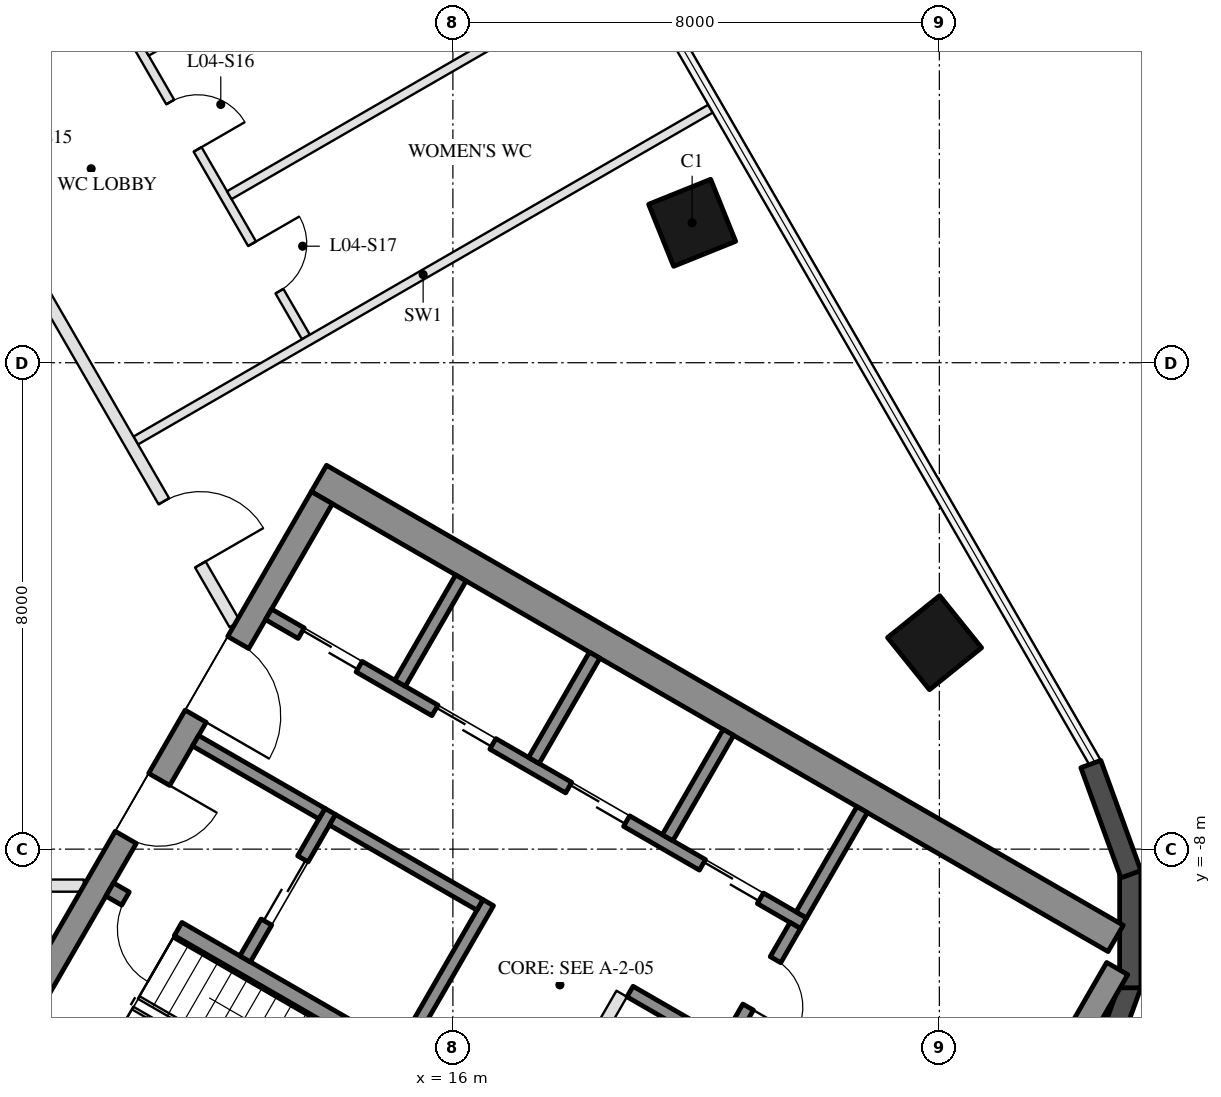
"""IFC4 building model, lengths in metres.
Left out: names, types, materials, properties, quantities, classifications, styles, units other than length and angle.
Written with IfcOpenShell. Run it as: python <this file> out.ifc"""

import sys

from ifc_helpers import new_model, si_unit, direction, frame, frame_2d, origin, origin_2d, place, context, subcontext, project, spatial, rectangle, hollow_rectangle, extrude, boolean, halfspace, element, fill, save


model = new_model("IFC4")
c1 = context("Model", 3, precision=1e-05, world=origin(), true_north=direction((0.0, 1.0)))
c2 = subcontext(c1, "Body", "Model", "MODEL_VIEW")
j1 = project(units=[si_unit("LENGTHUNIT", "METRE"), si_unit("PLANEANGLEUNIT", "RADIAN")], contexts=[c1])
p1 = place(None, origin())
s1 = spatial("IfcSite", under=j1, at=p1, CompositionType="ELEMENT")
p2 = place(p1, origin())
s2 = spatial("IfcBuilding", under=s1, at=p2, CompositionType="ELEMENT")
p3 = place(p2, frame((0.0, 0.0, 28.5)))
s3 = spatial("IfcBuildingStorey", under=s2, at=p3, CompositionType="ELEMENT", Elevation=28.5)
p4 = place(p3, frame((23.921, -4.604, 0.0), z_axis=(-0.038923767258, 0.006017462626, 0.999224064205), x_axis=(0.500000890421, -0.865672860901, 0.024690230408)))
e1 = element("IfcColumn", 1, at=p4, inside=s3, PredefinedType="COLUMN", context=c2, shape_type="SweptSolid", body=[
    boolean("DIFFERENCE", boolean("DIFFERENCE", extrude(hollow_rectangle(XDim=1.1, YDim=1.1, WallThickness=0.05, at=origin_2d()), origin(), (0.0, 0.0, 1.0), 4.503), halfspace(frame((0.0, 0.0, 0.013), z_axis=(0.0, 0.0, 1.0), x_axis=(1.0, 0.0, 0.0)), True)), halfspace(frame((0.0, 0.0, 4.491), z_axis=(0.0, 0.0, 1.0), x_axis=(1.0, 0.0, 0.0)), False)),
])
p5 = place(p3, frame((19.934, 2.301, 0.0), z_axis=(-0.032751169552, -0.004609022205, 0.999452909249), x_axis=(0.499064961058, -0.866476451895, 0.012358112959)))
e2 = element("IfcColumn", 2, at=p5, inside=s3, PredefinedType="COLUMN", context=c2, shape_type="SweptSolid", body=[
    boolean("DIFFERENCE", boolean("DIFFERENCE", extrude(hollow_rectangle(XDim=1.1, YDim=1.1, WallThickness=0.05, at=origin_2d()), origin(), (0.0, 0.0, 1.0), 4.502), halfspace(frame((0.0, 0.0, 0.011), z_axis=(0.0, 0.0, 1.0), x_axis=(1.0, 0.0, 0.0)), True)), halfspace(frame((0.0, 0.0, 4.492), z_axis=(0.0, 0.0, 1.0), x_axis=(1.0, 0.0, 0.0)), False)),
])
for number, where, z_axis, x_axis in (
    (3, (26.491, -12.033, 0.0), (0.0, 0.0, 1.0), (0.342, 0.94, 0.0)),
    (4, (27.14, -10.281, 0.0), (0.0, 0.0, 1.0), (0.0, 1.0, 0.0)),
    (5, (27.151, -8.413, 0.0), (0.0, 0.0, 1.0), (-0.342, 0.94, 0.0)),
):
    element("IfcWall", number, at=place(p3, frame(where, z_axis=z_axis, x_axis=x_axis)), inside=s3, PredefinedType="SOLIDWALL", context=c2, shape_type="SweptSolid", body=[
        extrude(rectangle(XDim=1.928, YDim=0.35, at=frame_2d((0.964, 0.0))), origin(), (0.0, 0.0, 1.0), 4.2),
    ])
p6 = place(p3, frame((13.797, -1.903, 0.0), z_axis=(0.0, 0.0, 1.0), x_axis=(0.866025168306, -0.500000407861, 0.0)))
e6 = element("IfcWall", 6, at=p6, inside=s3, PredefinedType="SHEAR", context=c2, shape_type="SweptSolid", body=[
    extrude(rectangle(XDim=15.13, YDim=0.5, at=frame_2d((7.565, 0.0))), origin(), (0.0, 0.0, 1.0), 4.2),
])
p7 = place(p3, frame((8.845, -10.88, 0.0), z_axis=(0.0, 0.0, 1.0), x_axis=(0.500004234368, 0.866022959057, 0.0)))
e7 = element("IfcWall", 7, at=p7, inside=s3, PredefinedType="SHEAR", context=c2, shape_type="SweptSolid", body=[
    extrude(rectangle(XDim=10.0, YDim=0.4, at=frame_2d((5.0, 0.0))), origin(), (0.0, 0.0, 1.0), 4.2),
])
p8 = place(p7, frame((3.55, 0.0, 0.0)))
e8 = element("IfcOpeningElement", 8, at=p8, cuts=e7, PredefinedType="OPENING", context=c2, shape_type="SweptSolid", body=[
    extrude(rectangle(XDim=1.1, YDim=2.1, at=frame_2d((0.55, 1.05))), frame((0.0, 0.21, 0.0), z_axis=(0.0, -1.0, 0.0), x_axis=(1.0, 0.0, 0.0)), (0.0, 0.0, 1.0), 0.42),
])
p9 = place(p7, frame((5.85, 0.0, 0.0)))
e9 = element("IfcOpeningElement", 9, at=p9, cuts=e7, PredefinedType="OPENING", context=c2, shape_type="SweptSolid", body=[
    extrude(rectangle(XDim=1.4, YDim=2.1, at=frame_2d((0.7, 1.05))), frame((0.0, 0.21, 0.0), z_axis=(0.0, -1.0, 0.0), x_axis=(1.0, 0.0, 0.0)), (0.0, 0.0, 1.0), 0.42),
])
p10 = place(p3, frame((25.309, -12.764, 0.0), z_axis=(0.0, 0.0, 1.0), x_axis=(0.499955552719, 0.866051063914, 0.0)))
e10 = element("IfcWall", 10, at=p10, inside=s3, PredefinedType="SHEAR", context=c2, shape_type="SweptSolid", body=[
    extrude(rectangle(XDim=3.234, YDim=0.4, at=frame_2d((1.617, 0.0))), origin(), (0.0, 0.0, 1.0), 4.2),
])
p11 = place(p3, frame((10.356, -8.664, 0.0), z_axis=(0.0, 0.0, 1.0), x_axis=(0.866028629588, -0.499994412703, 0.0)))
e11 = element("IfcWall", 11, at=p11, inside=s3, PredefinedType="SHEAR", context=c2, shape_type="SweptSolid", body=[
    extrude(rectangle(XDim=6.45, YDim=0.25, at=frame_2d((3.225, 0.0))), origin(), (0.0, 0.0, 1.0), 4.2),
])
p12 = place(p11, frame((0.3, 0.0, 0.0)))
e12 = element("IfcOpeningElement", 12, at=p12, cuts=e11, PredefinedType="OPENING", context=c2, shape_type="SweptSolid", body=[
    extrude(rectangle(XDim=1.0, YDim=2.1, at=frame_2d((0.5, 1.05))), frame((0.0, 0.135, 0.0), z_axis=(0.0, -1.0, 0.0), x_axis=(1.0, 0.0, 0.0)), (0.0, 0.0, 1.0), 0.27),
])
p13 = place(p3, frame((15.181, -11.305, 0.0), z_axis=(0.0, 0.0, 1.0), x_axis=(0.49994636267, 0.866056369097, 0.0)))
e13 = element("IfcWall", 13, at=p13, inside=s3, PredefinedType="SHEAR", context=c2, shape_type="SweptSolid", body=[
    extrude(rectangle(XDim=2.8, YDim=0.2, at=frame_2d((1.4, 0.0))), origin(), (0.0, 0.0, 1.0), 4.2),
])
p14 = place(p3, frame((12.583, -9.805, 0.0), z_axis=(0.0, 0.0, 1.0), x_axis=(0.49994636267, 0.866056369097, 0.0)))
e14 = element("IfcWall", 14, at=p14, inside=s3, PredefinedType="SHEAR", context=c2, shape_type="SweptSolid", body=[
    extrude(rectangle(XDim=2.8, YDim=0.2, at=frame_2d((1.4, 0.0))), origin(), (0.0, 0.0, 1.0), 4.2),
])
p15 = place(p14, frame((0.7, 0.0, 0.0)))
e15 = element("IfcOpeningElement", 15, at=p15, cuts=e14, PredefinedType="OPENING", context=c2, shape_type="SweptSolid", body=[
    extrude(rectangle(XDim=1.2, YDim=2.1, at=frame_2d((0.6, 1.05))), frame((0.0, 0.11, 0.0), z_axis=(0.0, -1.0, 0.0), x_axis=(1.0, 0.0, 0.0)), (0.0, 0.0, 1.0), 0.22),
])
p16 = place(p3, frame((11.768, -6.217, 0.0), z_axis=(0.0, 0.0, 1.0), x_axis=(0.866050077142, -0.499957262057, 0.0)))
e16 = element("IfcWall", 16, at=p16, inside=s3, PredefinedType="SHEAR", context=c2, shape_type="SweptSolid", body=[
    extrude(rectangle(XDim=2.4, YDim=0.2, at=frame_2d((1.2, 0.0))), origin(), (0.0, 0.0, 1.0), 4.2),
])
p17 = place(p3, frame((14.02, -7.517, 0.0), z_axis=(0.0, 0.0, 1.0), x_axis=(0.866034573852, -0.49998411664, 0.0)))
e17 = element("IfcWall", 17, at=p17, inside=s3, PredefinedType="SHEAR", context=c2, shape_type="SweptSolid", body=[
    extrude(rectangle(XDim=2.8, YDim=0.2, at=frame_2d((1.4, 0.0))), origin(), (0.0, 0.0, 1.0), 4.2),
])
p18 = place(p3, frame((12.968, -4.138, 0.0), z_axis=(0.0, 0.0, 1.0), x_axis=(0.866028328073, -0.49999493495, 0.0)))
e18 = element("IfcWall", 18, at=p18, inside=s3, PredefinedType="SHEAR", context=c2, shape_type="SweptSolid", body=[
    extrude(rectangle(XDim=10.16, YDim=0.2, at=frame_2d((5.08, 0.0))), origin(), (0.0, 0.0, 1.0), 4.2),
])
p19 = place(p18, frame((0.62, 0.0, 0.0)))
e19 = element("IfcOpeningElement", 19, at=p19, cuts=e18, PredefinedType="OPENING", context=c2, shape_type="SweptSolid", body=[
    extrude(rectangle(XDim=1.1, YDim=2.1, at=frame_2d((0.55, 1.05))), frame((0.0, 0.11, 0.0), z_axis=(0.0, -1.0, 0.0), x_axis=(1.0, 0.0, 0.0)), (0.0, 0.0, 1.0), 0.22),
])
p20 = place(p18, frame((3.16, 0.0, 0.0)))
e20 = element("IfcOpeningElement", 20, at=p20, cuts=e18, PredefinedType="OPENING", context=c2, shape_type="SweptSolid", body=[
    extrude(rectangle(XDim=1.1, YDim=2.1, at=frame_2d((0.55, 1.05))), frame((0.0, 0.11, 0.0), z_axis=(0.0, -1.0, 0.0), x_axis=(1.0, 0.0, 0.0)), (0.0, 0.0, 1.0), 0.22),
])
p21 = place(p18, frame((5.7, 0.0, 0.0)))
e21 = element("IfcOpeningElement", 21, at=p21, cuts=e18, PredefinedType="OPENING", context=c2, shape_type="SweptSolid", body=[
    extrude(rectangle(XDim=1.1, YDim=2.1, at=frame_2d((0.55, 1.05))), frame((0.0, 0.11, 0.0), z_axis=(0.0, -1.0, 0.0), x_axis=(1.0, 0.0, 0.0)), (0.0, 0.0, 1.0), 0.22),
])
p22 = place(p18, frame((8.24, 0.0, 0.0)))
e22 = element("IfcOpeningElement", 22, at=p22, cuts=e18, PredefinedType="OPENING", context=c2, shape_type="SweptSolid", body=[
    extrude(rectangle(XDim=1.1, YDim=2.1, at=frame_2d((0.55, 1.05))), frame((0.0, 0.11, 0.0), z_axis=(0.0, -1.0, 0.0), x_axis=(1.0, 0.0, 0.0)), (0.0, 0.0, 1.0), 0.22),
])
p23 = place(p3, frame((20.43, -11.333, 0.0), z_axis=(0.0, 0.0, 1.0), x_axis=(0.500001309137, 0.866024647952, 0.0)))
e23 = element("IfcWall", 23, at=p23, inside=s3, PredefinedType="SHEAR", context=c2, shape_type="SweptSolid", body=[
    extrude(rectangle(XDim=2.4, YDim=0.2, at=frame_2d((1.2, 0.0))), origin(), (0.0, 0.0, 1.0), 4.2),
])
p24 = place(p23, frame((0.85, 0.0, 0.0)))
e24 = element("IfcOpeningElement", 24, at=p24, cuts=e23, PredefinedType="OPENING", context=c2, shape_type="SweptSolid", body=[
    extrude(rectangle(XDim=0.9, YDim=2.1, at=frame_2d((0.45, 1.05))), frame((0.0, 0.11, 0.0), z_axis=(0.0, -1.0, 0.0), x_axis=(1.0, 0.0, 0.0)), (0.0, 0.0, 1.0), 0.22),
])
p25 = place(p3, frame((18.913, -10.342, 0.0), z_axis=(0.0, 0.0, 1.0), x_axis=(0.866038183914, -0.499977863513, 0.0)))
e25 = element("IfcWall", 25, at=p25, inside=s3, PredefinedType="SHEAR", context=c2, shape_type="SweptSolid", body=[
    extrude(rectangle(XDim=1.71, YDim=0.2, at=frame_2d((0.855, 0.0))), origin(), (0.0, 0.0, 1.0), 4.2),
])
for number, where, z_axis, x_axis in (
    (26, (15.131, -5.272, 0.0), (0.0, 0.0, 1.0), (0.5, 0.866, 0.0)),
    (27, (17.331, -6.542, 0.0), (0.0, 0.0, 1.0), (0.5, 0.866, 0.0)),
    (28, (19.531, -7.812, 0.0), (0.0, 0.0, 1.0), (0.5, 0.866, 0.0)),
    (29, (21.73, -9.082, 0.0), (0.0, 0.0, 1.0), (0.5, 0.866, 0.0)),
):
    element("IfcWall", number, at=place(p3, frame(where, z_axis=z_axis, x_axis=x_axis)), inside=s3, PredefinedType="SHEAR", context=c2, shape_type="SweptSolid", body=[
        extrude(rectangle(XDim=2.0, YDim=0.2, at=frame_2d((1.0, 0.0))), origin(), (0.0, 0.0, 1.0), 4.2),
    ])
p26 = place(p3, frame((16.076, -15.055, 0.0), z_axis=(0.0, 0.0, 1.0), x_axis=(0.499995103361, 0.866028230842, 0.0)))
e30 = element("IfcWall", 30, at=p26, inside=s3, PredefinedType="PARTITIONING", context=c2, shape_type="SweptSolid", body=[
    extrude(rectangle(XDim=5.4, YDim=0.2, at=frame_2d((2.7, 0.0))), origin(), (0.0, 0.0, 1.0), 4.2),
])
p27 = place(p26, frame((1.913, 0.0, 0.0)))
e31 = element("IfcOpeningElement", 31, at=p27, cuts=e30, PredefinedType="OPENING", context=c2, shape_type="SweptSolid", body=[
    extrude(rectangle(XDim=0.9, YDim=2.1, at=frame_2d((0.45, 1.05))), frame((0.0, 0.11, 0.0), z_axis=(0.0, -1.0, 0.0), x_axis=(1.0, 0.0, 0.0)), (0.0, 0.0, 1.0), 0.22),
])
p28 = place(p26, frame((3.788, 0.0, 0.0)))
e32 = element("IfcOpeningElement", 32, at=p28, cuts=e30, PredefinedType="OPENING", context=c2, shape_type="SweptSolid", body=[
    extrude(rectangle(XDim=0.9, YDim=2.1, at=frame_2d((0.45, 1.05))), frame((0.0, 0.11, 0.0), z_axis=(0.0, -1.0, 0.0), x_axis=(1.0, 0.0, 0.0)), (0.0, 0.0, 1.0), 0.22),
])
p29 = place(p3, frame((-9.93, -8.6, 0.0), z_axis=(0.0, 0.0, 1.0), x_axis=(1.0, 0.0, 0.0)))
e33 = element("IfcWall", 33, at=p29, inside=s3, PredefinedType="PARTITIONING", context=c2, shape_type="SweptSolid", body=[
    extrude(rectangle(XDim=19.861, YDim=0.2, at=frame_2d((9.93, 0.0))), origin(), (0.0, 0.0, 1.0), 3.41),
])
p30 = place(p29, frame((2.592, 0.0, 0.0)))
e34 = element("IfcOpeningElement", 34, at=p30, cuts=e33, PredefinedType="OPENING", context=c2, shape_type="SweptSolid", body=[
    extrude(rectangle(XDim=1.8, YDim=2.4, at=frame_2d((0.9, 1.2))), frame((0.0, 0.11, 0.0), z_axis=(0.0, -1.0, 0.0), x_axis=(1.0, 0.0, 0.0)), (0.0, 0.0, 1.0), 0.22),
])
p31 = place(p29, frame((9.575, 0.0, 0.0)))
e35 = element("IfcOpeningElement", 35, at=p31, cuts=e33, PredefinedType="OPENING", context=c2, shape_type="SweptSolid", body=[
    extrude(rectangle(XDim=1.8, YDim=2.4, at=frame_2d((0.9, 1.2))), frame((0.0, 0.11, 0.0), z_axis=(0.0, -1.0, 0.0), x_axis=(1.0, 0.0, 0.0)), (0.0, 0.0, 1.0), 0.22),
])
p32 = place(p29, frame((16.377, 0.0, 0.0)))
e36 = element("IfcOpeningElement", 36, at=p32, cuts=e33, PredefinedType="OPENING", context=c2, shape_type="SweptSolid", body=[
    extrude(rectangle(XDim=1.0, YDim=2.1, at=frame_2d((0.5, 1.05))), frame((0.0, 0.11, 0.0), z_axis=(0.0, -1.0, 0.0), x_axis=(1.0, 0.0, 0.0)), (0.0, 0.0, 1.0), 0.22),
])
p33 = place(p3, frame((13.583, 0.423, 0.0), z_axis=(0.0, 0.0, 1.0), x_axis=(-0.500005920892, 0.866021985329, 0.0)))
e37 = element("IfcWall", 37, at=p33, inside=s3, PredefinedType="PARTITIONING", context=c2, shape_type="SweptSolid", body=[
    extrude(rectangle(XDim=8.325, YDim=0.15, at=frame_2d((4.163, 0.0))), origin(), (0.0, 0.0, 1.0), 3.41),
])
p34 = place(p33, frame((6.354, 0.0, 0.0)))
e38 = element("IfcOpeningElement", 38, at=p34, cuts=e37, PredefinedType="OPENING", context=c2, shape_type="SweptSolid", body=[
    extrude(rectangle(XDim=1.0, YDim=2.1, at=frame_2d((0.5, 1.05))), frame((0.0, 0.085, 0.0), z_axis=(0.0, -1.0, 0.0), x_axis=(1.0, 0.0, 0.0)), (0.0, 0.0, 1.0), 0.17),
])
p35 = place(p33, frame((3.562, 0.0, 0.0)))
e39 = element("IfcOpeningElement", 39, at=p35, cuts=e37, PredefinedType="OPENING", context=c2, shape_type="SweptSolid", body=[
    extrude(rectangle(XDim=0.9, YDim=2.1, at=frame_2d((0.45, 1.05))), frame((0.0, 0.085, 0.0), z_axis=(0.0, -1.0, 0.0), x_axis=(1.0, 0.0, 0.0)), (0.0, 0.0, 1.0), 0.17),
])
p36 = place(p33, frame((0.871, 0.0, 0.0)))
e40 = element("IfcOpeningElement", 40, at=p36, cuts=e37, PredefinedType="OPENING", context=c2, shape_type="SweptSolid", body=[
    extrude(rectangle(XDim=0.9, YDim=2.1, at=frame_2d((0.45, 1.05))), frame((0.0, 0.085, 0.0), z_axis=(0.0, -1.0, 0.0), x_axis=(1.0, 0.0, 0.0)), (0.0, 0.0, 1.0), 0.17),
])
p37 = place(p3, frame((20.237, 4.178, 0.0), z_axis=(0.0, 0.0, 1.0), x_axis=(-0.866022430415, -0.500005149991, 0.0)))
e41 = element("IfcWall", 41, at=p37, inside=s3, PredefinedType="PARTITIONING", context=c2, shape_type="SweptSolid", body=[
    extrude(rectangle(XDim=10.915, YDim=0.15, at=frame_2d((5.457, 0.0))), origin(), (0.0, 0.0, 1.0), 3.6),
])
p38 = place(p3, frame((18.874, 6.538, 0.0), z_axis=(0.0, 0.0, 1.0), x_axis=(-0.866028121412, -0.499995292902, 0.0)))
e42 = element("IfcWall", 42, at=p38, inside=s3, PredefinedType="PARTITIONING", context=c2, shape_type="SweptSolid", body=[
    extrude(rectangle(XDim=7.565, YDim=0.15, at=frame_2d((3.782, 0.0))), origin(), (0.0, 0.0, 1.0), 3.41),
])
p39 = place(p3, frame((17.511, 8.898, 0.0), z_axis=(0.0, 0.0, 1.0), x_axis=(-0.866028121412, -0.499995292902, 0.0)))
e43 = element("IfcWall", 43, at=p39, inside=s3, PredefinedType="PARTITIONING", context=c2, shape_type="SweptSolid", body=[
    extrude(rectangle(XDim=7.565, YDim=0.15, at=frame_2d((3.782, 0.0))), origin(), (0.0, 0.0, 1.0), 3.6),
])
p40 = place(p3, frame((12.413, -4.3, 0.0), z_axis=(0.0, 0.0, 1.0), x_axis=(-0.50000478328, 0.866022642139, 0.0)))
e44 = element("IfcWall", 44, at=p40, inside=s3, PredefinedType="PARTITIONING", context=c2, shape_type="SweptSolid", body=[
    extrude(rectangle(XDim=19.861, YDim=0.2, at=frame_2d((9.931, 0.0))), origin(), (0.0, 0.0, 1.0), 3.41),
])
p41 = place(p40, frame((1.134, 0.0, 0.0)))
e45 = element("IfcOpeningElement", 45, at=p41, cuts=e44, PredefinedType="OPENING", context=c2, shape_type="SweptSolid", body=[
    extrude(rectangle(XDim=1.2, YDim=2.1, at=frame_2d((0.6, 1.05))), frame((0.0, 0.11, 0.0), z_axis=(0.0, -1.0, 0.0), x_axis=(1.0, 0.0, 0.0)), (0.0, 0.0, 1.0), 0.22),
])
p42 = place(p40, frame((16.89, 0.0, 0.0)))
e46 = element("IfcOpeningElement", 46, at=p42, cuts=e44, PredefinedType="OPENING", context=c2, shape_type="SweptSolid", body=[
    extrude(rectangle(XDim=1.8, YDim=2.4, at=frame_2d((0.9, 1.2))), frame((0.0, 0.11, 0.0), z_axis=(0.0, -1.0, 0.0), x_axis=(1.0, 0.0, 0.0)), (0.0, 0.0, 1.0), 0.22),
])
p43 = place(p40, frame((13.23, 0.0, 0.0)))
e47 = element("IfcOpeningElement", 47, at=p43, cuts=e44, PredefinedType="OPENING", context=c2, shape_type="SweptSolid", body=[
    extrude(rectangle(XDim=1.8, YDim=2.1, at=frame_2d((0.9, 1.05))), frame((0.0, 0.11, 0.0), z_axis=(0.0, -1.0, 0.0), x_axis=(1.0, 0.0, 0.0)), (0.0, 0.0, 1.0), 0.22),
])
p44 = place(p40, frame((7.168, 0.0, 0.0)))
e48 = element("IfcOpeningElement", 48, at=p44, cuts=e44, PredefinedType="OPENING", context=c2, shape_type="SweptSolid", body=[
    extrude(rectangle(XDim=1.0, YDim=2.1, at=frame_2d((0.5, 1.05))), frame((0.0, 0.11, 0.0), z_axis=(0.0, -1.0, 0.0), x_axis=(1.0, 0.0, 0.0)), (0.0, 0.0, 1.0), 0.22),
])
p45 = place(p15, origin())
e49 = element("IfcDoor", 49, at=p45, inside=s3, OperationType="DOUBLE_DOOR_SLIDING", PredefinedType="DOOR", context=c2, shape_type="SweptSolid", body=[
    extrude(rectangle(XDim=1.2, YDim=2.1, at=frame_2d((0.6, 1.05))), frame((0.0, 0.025, 0.0), z_axis=(0.0, -1.0, 0.0), x_axis=(1.0, 0.0, 0.0)), (0.0, 0.0, 1.0), 0.05),
])
fill(e15, e49)
p46 = place(p19, origin())
e50 = element("IfcDoor", 50, at=p46, inside=s3, OperationType="DOUBLE_DOOR_SLIDING", PredefinedType="DOOR", context=c2, shape_type="SweptSolid", body=[
    extrude(rectangle(XDim=1.1, YDim=2.1, at=frame_2d((0.55, 1.05))), frame((0.0, 0.025, 0.0), z_axis=(0.0, -1.0, 0.0), x_axis=(1.0, 0.0, 0.0)), (0.0, 0.0, 1.0), 0.05),
])
fill(e19, e50)
p47 = place(p20, origin())
e51 = element("IfcDoor", 51, at=p47, inside=s3, OperationType="DOUBLE_DOOR_SLIDING", PredefinedType="DOOR", context=c2, shape_type="SweptSolid", body=[
    extrude(rectangle(XDim=1.1, YDim=2.1, at=frame_2d((0.55, 1.05))), frame((0.0, 0.025, 0.0), z_axis=(0.0, -1.0, 0.0), x_axis=(1.0, 0.0, 0.0)), (0.0, 0.0, 1.0), 0.05),
])
fill(e20, e51)
p48 = place(p21, origin())
e52 = element("IfcDoor", 52, at=p48, inside=s3, OperationType="DOUBLE_DOOR_SLIDING", PredefinedType="DOOR", context=c2, shape_type="SweptSolid", body=[
    extrude(rectangle(XDim=1.1, YDim=2.1, at=frame_2d((0.55, 1.05))), frame((0.0, 0.025, 0.0), z_axis=(0.0, -1.0, 0.0), x_axis=(1.0, 0.0, 0.0)), (0.0, 0.0, 1.0), 0.05),
])
fill(e21, e52)
p49 = place(p22, origin())
e53 = element("IfcDoor", 53, at=p49, inside=s3, OperationType="DOUBLE_DOOR_SLIDING", PredefinedType="DOOR", context=c2, shape_type="SweptSolid", body=[
    extrude(rectangle(XDim=1.1, YDim=2.1, at=frame_2d((0.55, 1.05))), frame((0.0, 0.025, 0.0), z_axis=(0.0, -1.0, 0.0), x_axis=(1.0, 0.0, 0.0)), (0.0, 0.0, 1.0), 0.05),
])
fill(e22, e53)
p50 = place(p24, frame((0.9, 0.0, 0.0), z_axis=(0.0, 0.0, 1.0), x_axis=(-1.0, 0.0, 0.0)))
e54 = element("IfcDoor", 54, at=p50, inside=s3, OperationType="SINGLE_SWING_RIGHT", PredefinedType="DOOR", context=c2, shape_type="SweptSolid", body=[
    extrude(rectangle(XDim=0.9, YDim=2.1, at=frame_2d((0.45, 1.05))), frame((0.0, 0.025, 0.0), z_axis=(0.0, -1.0, 0.0), x_axis=(1.0, 0.0, 0.0)), (0.0, 0.0, 1.0), 0.05),
])
fill(e24, e54)
p51 = place(p8, frame((1.1, 0.0, 0.0), z_axis=(0.0, 0.0, 1.0), x_axis=(-1.0, 0.0, 0.0)))
e55 = element("IfcDoor", 55, at=p51, inside=s3, OperationType="SINGLE_SWING_LEFT", PredefinedType="DOOR", context=c2, shape_type="SweptSolid", body=[
    extrude(rectangle(XDim=1.1, YDim=2.1, at=frame_2d((0.55, 1.05))), frame((0.0, 0.025, 0.0), z_axis=(0.0, -1.0, 0.0), x_axis=(1.0, 0.0, 0.0)), (0.0, 0.0, 1.0), 0.05),
])
fill(e8, e55)
p52 = place(p9, frame((1.4, 0.0, 0.0), z_axis=(0.0, 0.0, 1.0), x_axis=(-1.0, 0.0, 0.0)))
e56 = element("IfcDoor", 56, at=p52, inside=s3, OperationType="DOUBLE_DOOR_SINGLE_SWING", PredefinedType="DOOR", context=c2, shape_type="SweptSolid", body=[
    extrude(rectangle(XDim=1.4, YDim=2.1, at=frame_2d((0.7, 1.05))), frame((0.0, 0.025, 0.0), z_axis=(0.0, -1.0, 0.0), x_axis=(1.0, 0.0, 0.0)), (0.0, 0.0, 1.0), 0.05),
])
fill(e9, e56)
p53 = place(p12, frame((1.0, 0.0, 0.0), z_axis=(0.0, 0.0, 1.0), x_axis=(-1.0, 0.0, 0.0)))
e57 = element("IfcDoor", 57, at=p53, inside=s3, OperationType="SINGLE_SWING_LEFT", PredefinedType="DOOR", context=c2, shape_type="SweptSolid", body=[
    extrude(rectangle(XDim=1.0, YDim=2.1, at=frame_2d((0.5, 1.05))), frame((0.0, 0.025, 0.0), z_axis=(0.0, -1.0, 0.0), x_axis=(1.0, 0.0, 0.0)), (0.0, 0.0, 1.0), 0.05),
])
fill(e12, e57)
p54 = place(p41, frame((1.2, 0.0, 0.0), z_axis=(0.0, 0.0, 1.0), x_axis=(-1.0, 0.0, 0.0)))
e58 = element("IfcDoor", 58, at=p54, inside=s3, OperationType="SINGLE_SWING_RIGHT", PredefinedType="DOOR", context=c2, shape_type="SweptSolid", body=[
    extrude(rectangle(XDim=1.2, YDim=2.1, at=frame_2d((0.6, 1.05))), frame((0.0, 0.025, 0.0), z_axis=(0.0, -1.0, 0.0), x_axis=(1.0, 0.0, 0.0)), (0.0, 0.0, 1.0), 0.05),
])
fill(e45, e58)
p55 = place(p35, frame((0.9, 0.0, 0.0), z_axis=(0.0, 0.0, 1.0), x_axis=(-1.0, 0.0, 0.0)))
e59 = element("IfcDoor", 59, at=p55, inside=s3, OperationType="SINGLE_SWING_RIGHT", PredefinedType="DOOR", context=c2, shape_type="SweptSolid", body=[
    extrude(rectangle(XDim=0.9, YDim=2.1, at=frame_2d((0.45, 1.05))), frame((0.0, 0.025, 0.0), z_axis=(0.0, -1.0, 0.0), x_axis=(1.0, 0.0, 0.0)), (0.0, 0.0, 1.0), 0.05),
])
fill(e39, e59)
p56 = place(p36, frame((0.9, 0.0, 0.0), z_axis=(0.0, 0.0, 1.0), x_axis=(-1.0, 0.0, 0.0)))
e60 = element("IfcDoor", 60, at=p56, inside=s3, OperationType="SINGLE_SWING_LEFT", PredefinedType="DOOR", context=c2, shape_type="SweptSolid", body=[
    extrude(rectangle(XDim=0.9, YDim=2.1, at=frame_2d((0.45, 1.05))), frame((0.0, 0.025, 0.0), z_axis=(0.0, -1.0, 0.0), x_axis=(1.0, 0.0, 0.0)), (0.0, 0.0, 1.0), 0.05),
])
fill(e40, e60)
save(model, sys.argv[1])
